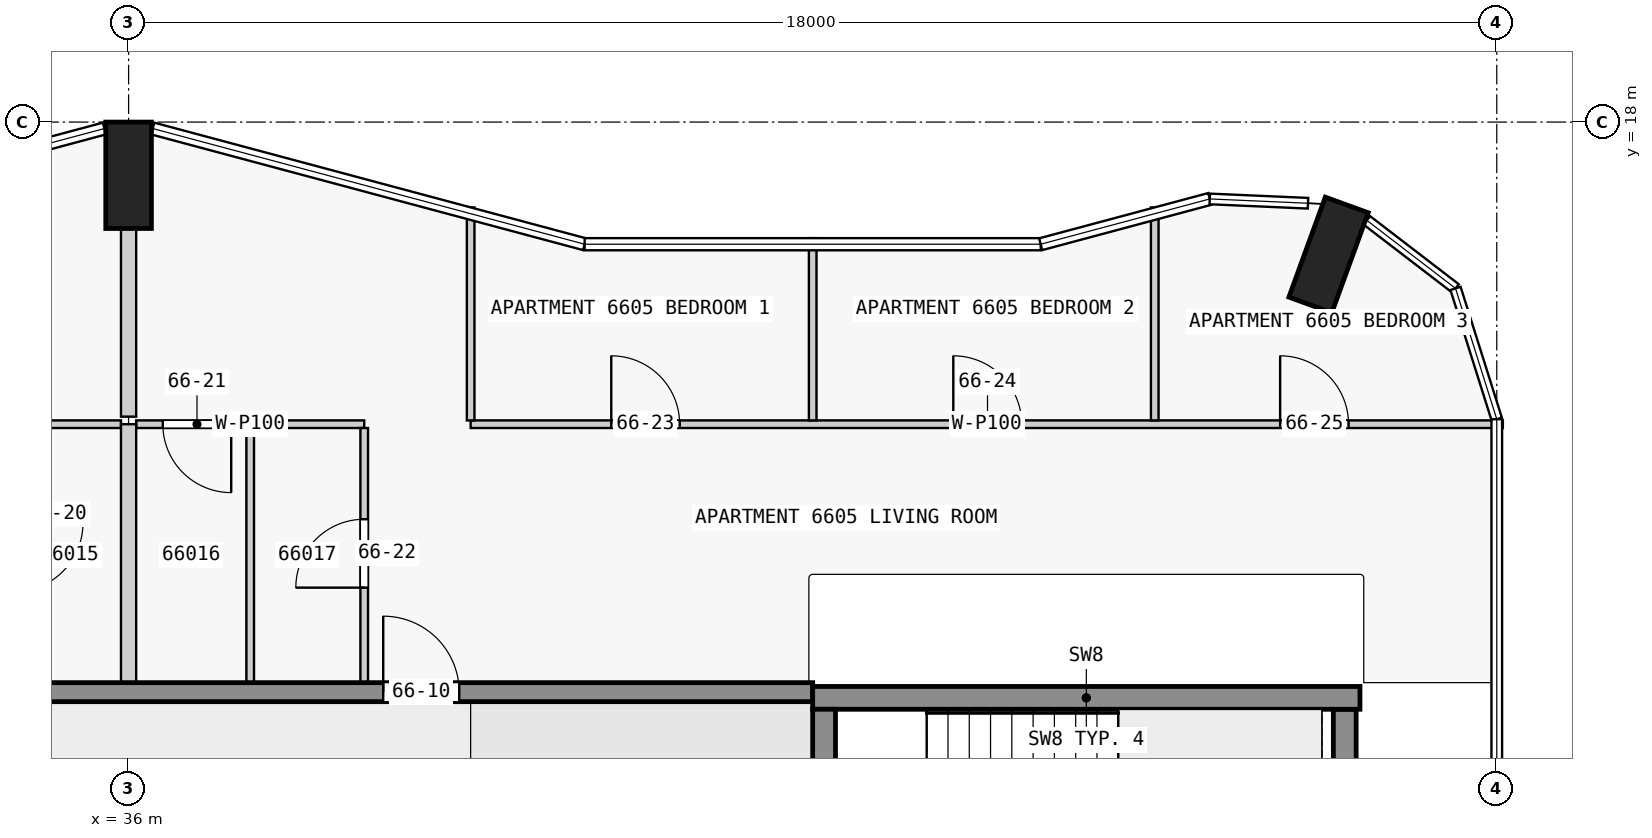
"""IFC4 building model, lengths in metres.
Left out: names, types, materials, properties, quantities, classifications, styles, units other than length and angle.
Written with IfcOpenShell. Run it as: python <this file> out.ifc"""

import sys

from ifc_helpers import new_model, si_unit, direction, frame, frame_2d, origin, origin_2d, place, context, subcontext, project, spatial, rectangle, extrude, element, fill, save


model = new_model("IFC4")
c1 = context("Model", 3, precision=1e-05, world=origin(), true_north=direction((0.0, 1.0)))
c2 = subcontext(c1, "Body", "Model", "MODEL_VIEW")
j1 = project(units=[si_unit("LENGTHUNIT", "METRE"), si_unit("PLANEANGLEUNIT", "RADIAN")], contexts=[c1])
p1 = place(None, origin())
s1 = spatial("IfcSite", under=j1, at=p1, CompositionType="ELEMENT")
p2 = place(p1, origin())
s2 = spatial("IfcBuilding", under=s1, at=p2, CompositionType="ELEMENT")
p3 = place(p2, frame((0.0, 0.0, 252.9)))
s3 = spatial("IfcBuildingStorey", under=s2, at=p3, CompositionType="ELEMENT", Elevation=252.9)
for number, where, z_axis, x_axis in (
    (1, (51.787, 16.252, 0.0), (0.0, 0.0, 1.0), (-0.94, 0.342, 0.0)),
    (2, (36.0, 17.3, 0.0), (0.0, 0.0, 1.0), (1.0, 0.0, 0.0)),
):
    element("IfcColumn", number, at=place(p3, frame(where, z_axis=z_axis, x_axis=x_axis)), inside=s3, PredefinedType="COLUMN", context=c2, shape_type="SweptSolid", body=[
        extrude(rectangle(XDim=0.6, YDim=1.4, at=origin_2d()), origin(), (0.0, 0.0, 1.0), 3.5),
    ])
p4 = place(p3, frame((45.15, 7.725, 0.0), z_axis=(0.0, 0.0, 1.0), x_axis=(0.0, 1.0, 0.0)))
e3 = element("IfcWall", 3, at=p4, inside=s3, PredefinedType="SHEAR", context=c2, shape_type="SweptSolid", body=[
    extrude(rectangle(XDim=2.55, YDim=0.3, at=frame_2d((1.275, 0.0))), origin(), (0.0, 0.0, 1.0), 3.5),
])
p5 = place(p4, frame((0.725, 0.0, 0.0)))
e4 = element("IfcOpeningElement", 4, at=p5, cuts=e3, PredefinedType="OPENING", context=c2, shape_type="SweptSolid", body=[
    extrude(rectangle(XDim=1.1, YDim=2.1, at=frame_2d((0.55, 1.05))), frame((0.0, 0.16, 0.0), z_axis=(0.0, -1.0, 0.0), x_axis=(1.0, 0.0, 0.0)), (0.0, 0.0, 1.0), 0.32),
])
p6 = place(p3, frame((52.0, 7.725, 0.0), z_axis=(0.0, 0.0, 1.0), x_axis=(0.0, 1.0, 0.0)))
e5 = element("IfcWall", 5, at=p6, inside=s3, PredefinedType="SHEAR", context=c2, shape_type="SweptSolid", body=[
    extrude(rectangle(XDim=2.55, YDim=0.3, at=frame_2d((1.275, 0.0))), origin(), (0.0, 0.0, 1.0), 3.5),
])
p7 = place(p3, frame((45.0, 10.425, 0.0), z_axis=(0.0, 0.0, 1.0), x_axis=(1.0, 0.0, 0.0)))
e6 = element("IfcWall", 6, at=p7, inside=s3, PredefinedType="SHEAR", context=c2, shape_type="SweptSolid", body=[
    extrude(rectangle(XDim=7.2, YDim=0.3, at=frame_2d((3.6, 0.0))), origin(), (0.0, 0.0, 1.0), 3.5),
])
p8 = place(p3, frame((22.5, 10.5, 0.0), z_axis=(0.0, 0.0, 1.0), x_axis=(1.0, 0.0, 0.0)))
e7 = element("IfcWall", 7, at=p8, inside=s3, PredefinedType="SHEAR", context=c2, shape_type="SweptSolid", body=[
    extrude(rectangle(XDim=22.5, YDim=0.25, at=frame_2d((11.25, 0.0))), origin(), (0.0, 0.0, 1.0), 3.25),
])
p9 = place(p8, frame((1.75, 0.0, 0.0)))
e8 = element("IfcOpeningElement", 8, at=p9, cuts=e7, PredefinedType="OPENING", context=c2, shape_type="SweptSolid", body=[
    extrude(rectangle(XDim=1.0, YDim=2.1, at=frame_2d((0.5, 1.05))), frame((0.0, 0.135, 0.0), z_axis=(0.0, -1.0, 0.0), x_axis=(1.0, 0.0, 0.0)), (0.0, 0.0, 1.0), 0.27),
])
p10 = place(p8, frame((6.25, 0.0, 0.0)))
e9 = element("IfcOpeningElement", 9, at=p10, cuts=e7, PredefinedType="OPENING", context=c2, shape_type="SweptSolid", body=[
    extrude(rectangle(XDim=1.0, YDim=2.1, at=frame_2d((0.5, 1.05))), frame((0.0, 0.135, 0.0), z_axis=(0.0, -1.0, 0.0), x_axis=(1.0, 0.0, 0.0)), (0.0, 0.0, 1.0), 0.27),
])
p11 = place(p8, frame((10.75, 0.0, 0.0)))
e10 = element("IfcOpeningElement", 10, at=p11, cuts=e7, PredefinedType="OPENING", context=c2, shape_type="SweptSolid", body=[
    extrude(rectangle(XDim=1.0, YDim=2.1, at=frame_2d((0.5, 1.05))), frame((0.0, 0.135, 0.0), z_axis=(0.0, -1.0, 0.0), x_axis=(1.0, 0.0, 0.0)), (0.0, 0.0, 1.0), 0.27),
])
p12 = place(p8, frame((16.85, 0.0, 0.0)))
e11 = element("IfcOpeningElement", 11, at=p12, cuts=e7, PredefinedType="OPENING", context=c2, shape_type="SweptSolid", body=[
    extrude(rectangle(XDim=1.0, YDim=2.1, at=frame_2d((0.5, 1.05))), frame((0.0, 0.135, 0.0), z_axis=(0.0, -1.0, 0.0), x_axis=(1.0, 0.0, 0.0)), (0.0, 0.0, 1.0), 0.27),
])
p13 = place(p3, frame((35.9, 14.025, 0.0), z_axis=(0.0, 0.0, 1.0), x_axis=(-1.0, 0.0, 0.0)))
e12 = element("IfcWall", 12, at=p13, inside=s3, PredefinedType="PARTITIONING", context=c2, shape_type="SweptSolid", body=[
    extrude(rectangle(XDim=1.4, YDim=0.1, at=frame_2d((0.7, 0.0))), origin(), (0.0, 0.0, 1.0), 3.25),
])
p14 = place(p3, frame((39.1, 14.025, 0.0), z_axis=(0.0, 0.0, 1.0), x_axis=(-1.0, 0.0, 0.0)))
e13 = element("IfcWall", 13, at=p14, inside=s3, PredefinedType="PARTITIONING", context=c2, shape_type="SweptSolid", body=[
    extrude(rectangle(XDim=3.0, YDim=0.1, at=frame_2d((1.5, 0.0))), origin(), (0.0, 0.0, 1.0), 3.25),
])
p15 = place(p14, frame((1.75, 0.0, 0.0)))
e14 = element("IfcOpeningElement", 14, at=p15, cuts=e13, PredefinedType="OPENING", context=c2, shape_type="SweptSolid", body=[
    extrude(rectangle(XDim=0.9, YDim=2.1, at=frame_2d((0.45, 1.05))), frame((0.0, 0.06, 0.0), z_axis=(0.0, -1.0, 0.0), x_axis=(1.0, 0.0, 0.0)), (0.0, 0.0, 1.0), 0.12),
])
p16 = place(p3, frame((40.5, 14.025, 0.0), z_axis=(0.0, 0.0, 1.0), x_axis=(1.0, 0.0, 0.0)))
e15 = element("IfcWall", 15, at=p16, inside=s3, PredefinedType="PARTITIONING", context=c2, shape_type="SweptSolid", body=[
    extrude(rectangle(XDim=13.58, YDim=0.1, at=frame_2d((6.79, 0.0))), origin(), (0.0, 0.0, 1.0), 3.25),
])
p17 = place(p16, frame((1.85, 0.0, 0.0)))
e16 = element("IfcOpeningElement", 16, at=p17, cuts=e15, PredefinedType="OPENING", context=c2, shape_type="SweptSolid", body=[
    extrude(rectangle(XDim=0.9, YDim=2.1, at=frame_2d((0.45, 1.05))), frame((0.0, 0.06, 0.0), z_axis=(0.0, -1.0, 0.0), x_axis=(1.0, 0.0, 0.0)), (0.0, 0.0, 1.0), 0.12),
])
p18 = place(p16, frame((6.35, 0.0, 0.0)))
e17 = element("IfcOpeningElement", 17, at=p18, cuts=e15, PredefinedType="OPENING", context=c2, shape_type="SweptSolid", body=[
    extrude(rectangle(XDim=0.9, YDim=2.1, at=frame_2d((0.45, 1.05))), frame((0.0, 0.06, 0.0), z_axis=(0.0, -1.0, 0.0), x_axis=(1.0, 0.0, 0.0)), (0.0, 0.0, 1.0), 0.12),
])
p19 = place(p16, frame((10.65, 0.0, 0.0)))
e18 = element("IfcOpeningElement", 18, at=p19, cuts=e15, PredefinedType="OPENING", context=c2, shape_type="SweptSolid", body=[
    extrude(rectangle(XDim=0.9, YDim=2.1, at=frame_2d((0.45, 1.05))), frame((0.0, 0.06, 0.0), z_axis=(0.0, -1.0, 0.0), x_axis=(1.0, 0.0, 0.0)), (0.0, 0.0, 1.0), 0.12),
])
p20 = place(p3, frame((36.0, 16.6, 0.0), z_axis=(0.0, 0.0, 1.0), x_axis=(0.0, -1.0, 0.0)))
e19 = element("IfcWall", 19, at=p20, inside=s3, PredefinedType="PARTITIONING", context=c2, shape_type="SweptSolid", body=[
    extrude(rectangle(XDim=2.475, YDim=0.2, at=frame_2d((1.238, 0.0))), origin(), (0.0, 0.0, 1.0), 3.25),
])
p21 = place(p3, frame((36.0, 10.625, 0.0), z_axis=(0.0, 0.0, 1.0), x_axis=(0.0, 1.0, 0.0)))
e20 = element("IfcWall", 20, at=p21, inside=s3, PredefinedType="PARTITIONING", context=c2, shape_type="SweptSolid", body=[
    extrude(rectangle(XDim=3.4, YDim=0.2, at=frame_2d((1.7, 0.0))), origin(), (0.0, 0.0, 1.0), 3.25),
])
p22 = place(p3, frame((37.6, 10.625, 0.0), z_axis=(0.0, 0.0, 1.0), x_axis=(0.0, 1.0, 0.0)))
e21 = element("IfcWall", 21, at=p22, inside=s3, PredefinedType="PARTITIONING", context=c2, shape_type="SweptSolid", body=[
    extrude(rectangle(XDim=3.35, YDim=0.1, at=frame_2d((1.675, 0.0))), origin(), (0.0, 0.0, 1.0), 3.25),
])
p23 = place(p3, frame((39.1, 10.625, 0.0), z_axis=(0.0, 0.0, 1.0), x_axis=(0.0, 1.0, 0.0)))
e22 = element("IfcWall", 22, at=p23, inside=s3, PredefinedType="PARTITIONING", context=c2, shape_type="SweptSolid", body=[
    extrude(rectangle(XDim=3.35, YDim=0.1, at=frame_2d((1.675, 0.0))), origin(), (0.0, 0.0, 1.0), 3.25),
])
p24 = place(p23, frame((1.25, 0.0, 0.0)))
e23 = element("IfcOpeningElement", 23, at=p24, cuts=e22, PredefinedType="OPENING", context=c2, shape_type="SweptSolid", body=[
    extrude(rectangle(XDim=0.9, YDim=2.1, at=frame_2d((0.45, 1.05))), frame((0.0, 0.06, 0.0), z_axis=(0.0, -1.0, 0.0), x_axis=(1.0, 0.0, 0.0)), (0.0, 0.0, 1.0), 0.12),
])
p25 = place(p3, frame((40.5, 16.878, 0.0), z_axis=(0.0, 0.0, 1.0), x_axis=(0.0, -1.0, 0.0)))
e24 = element("IfcWall", 24, at=p25, inside=s3, PredefinedType="PARTITIONING", context=c2, shape_type="SweptSolid", body=[
    extrude(rectangle(XDim=2.803, YDim=0.1, at=frame_2d((1.401, 0.0))), origin(), (0.0, 0.0, 1.0), 3.25),
])
p26 = place(p3, frame((45.0, 14.075, 0.0), z_axis=(0.0, 0.0, 1.0), x_axis=(0.0, 1.0, 0.0)))
e25 = element("IfcWall", 25, at=p26, inside=s3, PredefinedType="PARTITIONING", context=c2, shape_type="SweptSolid", body=[
    extrude(rectangle(XDim=2.398, YDim=0.1, at=frame_2d((1.199, 0.0))), origin(), (0.0, 0.0, 1.0), 3.25),
])
p27 = place(p3, frame((49.5, 14.075, 0.0), z_axis=(0.0, 0.0, 1.0), x_axis=(0.0, 1.0, 0.0)))
e26 = element("IfcWall", 26, at=p27, inside=s3, PredefinedType="PARTITIONING", context=c2, shape_type="SweptSolid", body=[
    extrude(rectangle(XDim=2.803, YDim=0.1, at=frame_2d((1.401, 0.0))), origin(), (0.0, 0.0, 1.0), 3.25),
])
p28 = place(p12, origin())
e27 = element("IfcDoor", 27, at=p28, inside=s3, OperationType="SINGLE_SWING_RIGHT", PredefinedType="DOOR", context=c2, shape_type="SweptSolid", body=[
    extrude(rectangle(XDim=1.0, YDim=2.1, at=frame_2d((0.5, 1.05))), frame((0.0, 0.025, 0.0), z_axis=(0.0, -1.0, 0.0), x_axis=(1.0, 0.0, 0.0)), (0.0, 0.0, 1.0), 0.05),
])
fill(e11, e27)
p29 = place(p15, origin())
e28 = element("IfcDoor", 28, at=p29, inside=s3, OperationType="SINGLE_SWING_RIGHT", PredefinedType="DOOR", context=c2, shape_type="SweptSolid", body=[
    extrude(rectangle(XDim=0.9, YDim=2.1, at=frame_2d((0.45, 1.05))), frame((0.0, 0.025, 0.0), z_axis=(0.0, -1.0, 0.0), x_axis=(1.0, 0.0, 0.0)), (0.0, 0.0, 1.0), 0.05),
])
fill(e14, e28)
p30 = place(p24, origin())
e29 = element("IfcDoor", 29, at=p30, inside=s3, OperationType="SINGLE_SWING_RIGHT", PredefinedType="DOOR", context=c2, shape_type="SweptSolid", body=[
    extrude(rectangle(XDim=0.9, YDim=2.1, at=frame_2d((0.45, 1.05))), frame((0.0, 0.025, 0.0), z_axis=(0.0, -1.0, 0.0), x_axis=(1.0, 0.0, 0.0)), (0.0, 0.0, 1.0), 0.05),
])
fill(e23, e29)
p31 = place(p17, origin())
e30 = element("IfcDoor", 30, at=p31, inside=s3, OperationType="SINGLE_SWING_LEFT", PredefinedType="DOOR", context=c2, shape_type="SweptSolid", body=[
    extrude(rectangle(XDim=0.9, YDim=2.1, at=frame_2d((0.45, 1.05))), frame((0.0, 0.025, 0.0), z_axis=(0.0, -1.0, 0.0), x_axis=(1.0, 0.0, 0.0)), (0.0, 0.0, 1.0), 0.05),
])
fill(e16, e30)
p32 = place(p18, origin())
e31 = element("IfcDoor", 31, at=p32, inside=s3, OperationType="SINGLE_SWING_RIGHT", PredefinedType="DOOR", context=c2, shape_type="SweptSolid", body=[
    extrude(rectangle(XDim=0.9, YDim=2.1, at=frame_2d((0.45, 1.05))), frame((0.0, 0.025, 0.0), z_axis=(0.0, -1.0, 0.0), x_axis=(1.0, 0.0, 0.0)), (0.0, 0.0, 1.0), 0.05),
])
fill(e17, e31)
p33 = place(p19, origin())
e32 = element("IfcDoor", 32, at=p33, inside=s3, OperationType="SINGLE_SWING_RIGHT", PredefinedType="DOOR", context=c2, shape_type="SweptSolid", body=[
    extrude(rectangle(XDim=0.9, YDim=2.1, at=frame_2d((0.45, 1.05))), frame((0.0, 0.025, 0.0), z_axis=(0.0, -1.0, 0.0), x_axis=(1.0, 0.0, 0.0)), (0.0, 0.0, 1.0), 0.05),
])
fill(e18, e32)
save(model, sys.argv[1])
